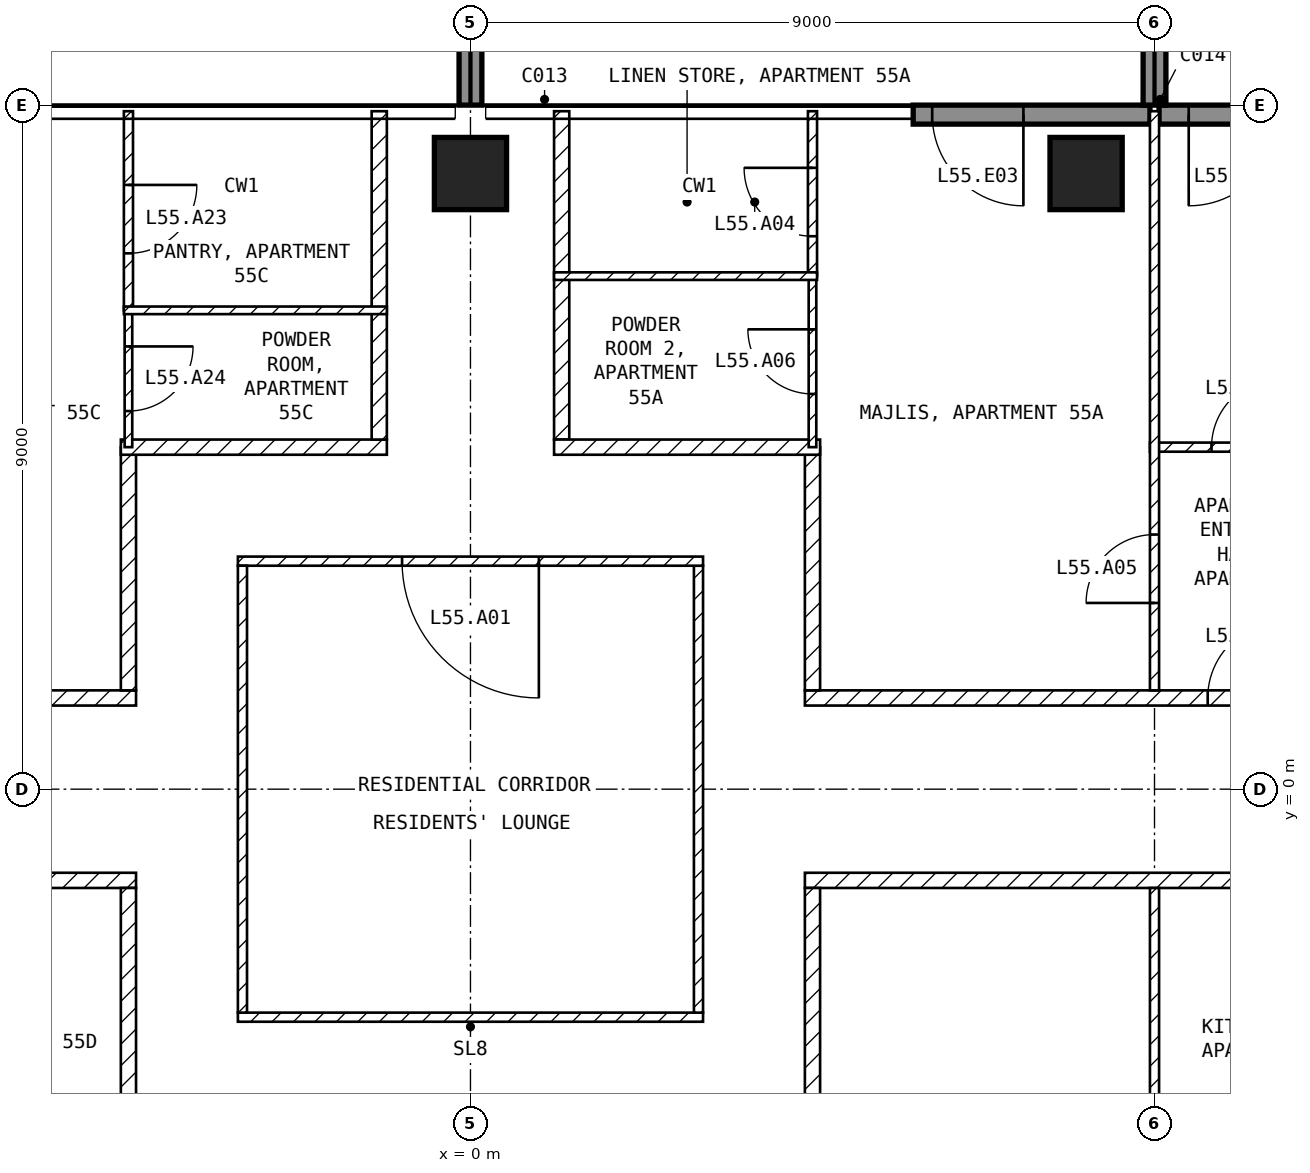
"""IFC4 building model, lengths in metres.
Left out: names, types, materials, properties, quantities, classifications, styles, units other than length and angle.
Written with IfcOpenShell. Run it as: python <this file> out.ifc"""

import sys

from ifc_helpers import new_model, si_unit, direction, frame, frame_2d, origin, origin_2d, place, context, subcontext, project, spatial, rectangle, extrude, element, fill, save


model = new_model("IFC4")
c1 = context("Model", 3, precision=1e-05, world=origin(), true_north=direction((0.0, 1.0)))
c2 = subcontext(c1, "Body", "Model", "MODEL_VIEW")
j1 = project(units=[si_unit("LENGTHUNIT", "METRE"), si_unit("PLANEANGLEUNIT", "RADIAN")], contexts=[c1])
p1 = place(None, origin())
s1 = spatial("IfcSite", under=j1, at=p1, CompositionType="ELEMENT")
p2 = place(p1, origin())
s2 = spatial("IfcBuilding", under=s1, at=p2, CompositionType="ELEMENT")
p3 = place(p2, frame((0.0, 0.0, 219.1)))
s3 = spatial("IfcBuildingStorey", under=s2, at=p3, CompositionType="ELEMENT", Elevation=219.1)
for number, where, z_axis, x_axis in (
    (1, (0.0, 8.1, -0.25), (0.0, 0.0, 1.0), (1.0, 0.0, 0.0)),
    (2, (8.1, 8.1, -0.25), (0.0, 0.0, 1.0), (1.0, 0.0, 0.0)),
):
    element("IfcColumn", number, at=place(p3, frame(where, z_axis=z_axis, x_axis=x_axis)), inside=s3, PredefinedType="COLUMN", context=c2, shape_type="SweptSolid", body=[
        extrude(rectangle(XDim=0.95, YDim=0.95, at=origin_2d()), origin(), (0.0, 0.0, 1.0), 3.45),
    ])
p4 = place(p3, frame((10.9, 8.875, 0.0), z_axis=(0.0, 0.0, 1.0), x_axis=(-1.0, 0.0, 0.0)))
e3 = element("IfcWall", 3, at=p4, inside=s3, PredefinedType="SOLIDWALL", context=c2, shape_type="SweptSolid", body=[
    extrude(rectangle(XDim=1.84, YDim=0.25, at=frame_2d((0.92, 0.0))), origin(), (0.0, 0.0, 1.0), 3.2),
])
p5 = place(p4, frame((0.25, 0.0, 0.0)))
e4 = element("IfcOpeningElement", 4, at=p5, cuts=e3, PredefinedType="OPENING", context=c2, shape_type="SweptSolid", body=[
    extrude(rectangle(XDim=1.2, YDim=2.4, at=frame_2d((0.6, 1.2))), frame((0.0, 0.135, 0.0), z_axis=(0.0, -1.0, 0.0), x_axis=(1.0, 0.0, 0.0)), (0.0, 0.0, 1.0), 0.27),
])
p6 = place(p3, frame((8.94, 8.875, 0.0), z_axis=(0.0, 0.0, 1.0), x_axis=(-1.0, 0.0, 0.0)))
e5 = element("IfcWall", 5, at=p6, inside=s3, PredefinedType="SOLIDWALL", context=c2, shape_type="SweptSolid", body=[
    extrude(rectangle(XDim=3.115, YDim=0.25, at=frame_2d((1.558, 0.0))), origin(), (0.0, 0.0, 1.0), 3.2),
])
p7 = place(p6, frame((1.665, 0.0, 0.0)))
e6 = element("IfcOpeningElement", 6, at=p7, cuts=e5, PredefinedType="OPENING", context=c2, shape_type="SweptSolid", body=[
    extrude(rectangle(XDim=1.2, YDim=2.4, at=frame_2d((0.6, 1.2))), frame((0.0, 0.135, 0.0), z_axis=(0.0, -1.0, 0.0), x_axis=(1.0, 0.0, 0.0)), (0.0, 0.0, 1.0), 0.27),
])
for number, where, z_axis, x_axis in (
    (7, (0.0, 9.0, 0.0), (0.0, 0.0, 1.0), (0.0, 1.0, 0.0)),
    (8, (9.0, 9.0, 0.0), (0.0, 0.0, 1.0), (0.0, 1.0, 0.0)),
):
    element("IfcWall", number, at=place(p3, frame(where, z_axis=z_axis, x_axis=x_axis)), inside=s3, PredefinedType="SOLIDWALL", context=c2, shape_type="SweptSolid", body=[
        extrude(rectangle(XDim=2.7, YDim=0.3, at=frame_2d((1.35, 0.0))), origin(), (0.0, 0.0, 1.0), 3.2),
    ])
p8 = place(p3, frame((-3.06, -3.0, 0.0), z_axis=(0.0, 0.0, 1.0), x_axis=(1.0, 0.0, 0.0)))
e9 = element("IfcWall", 9, at=p8, inside=s3, PredefinedType="PARTITIONING", context=c2, shape_type="SweptSolid", body=[
    extrude(rectangle(XDim=6.12, YDim=0.12, at=frame_2d((3.06, 0.0))), origin(), (0.0, 0.0, 1.0), 3.2),
])
p9 = place(p3, frame((3.0, -2.94, 0.0), z_axis=(0.0, 0.0, 1.0), x_axis=(0.0, 1.0, 0.0)))
e10 = element("IfcWall", 10, at=p9, inside=s3, PredefinedType="PARTITIONING", context=c2, shape_type="SweptSolid", body=[
    extrude(rectangle(XDim=5.88, YDim=0.12, at=frame_2d((2.94, 0.0))), origin(), (0.0, 0.0, 1.0), 3.2),
])
p10 = place(p3, frame((3.06, 3.0, 0.0), z_axis=(0.0, 0.0, 1.0), x_axis=(-1.0, 0.0, 0.0)))
e11 = element("IfcWall", 11, at=p10, inside=s3, PredefinedType="PARTITIONING", context=c2, shape_type="SweptSolid", body=[
    extrude(rectangle(XDim=6.12, YDim=0.12, at=frame_2d((3.06, 0.0))), origin(), (0.0, 0.0, 1.0), 3.2),
])
p11 = place(p10, frame((2.16, 0.0, 0.0)))
e12 = element("IfcOpeningElement", 12, at=p11, cuts=e11, PredefinedType="OPENING", context=c2, shape_type="SweptSolid", body=[
    extrude(rectangle(XDim=1.8, YDim=2.1, at=frame_2d((0.9, 1.05))), frame((0.0, 0.07, 0.0), z_axis=(0.0, -1.0, 0.0), x_axis=(1.0, 0.0, 0.0)), (0.0, 0.0, 1.0), 0.14),
])
p12 = place(p3, frame((-3.0, 2.94, 0.0), z_axis=(0.0, 0.0, 1.0), x_axis=(0.0, -1.0, 0.0)))
e13 = element("IfcWall", 13, at=p12, inside=s3, PredefinedType="PARTITIONING", context=c2, shape_type="SweptSolid", body=[
    extrude(rectangle(XDim=5.88, YDim=0.12, at=frame_2d((2.94, 0.0))), origin(), (0.0, 0.0, 1.0), 3.2),
])
p13 = place(p3, frame((4.4, 1.2, 0.0), z_axis=(0.0, 0.0, 1.0), x_axis=(1.0, 0.0, 0.0)))
e14 = element("IfcWall", 14, at=p13, inside=s3, PredefinedType="PARTITIONING", context=c2, shape_type="SweptSolid", body=[
    extrude(rectangle(XDim=17.2, YDim=0.2, at=frame_2d((8.6, 0.0))), origin(), (0.0, 0.0, 1.0), 3.2),
])
p14 = place(p13, frame((5.3, 0.0, 0.0)))
e15 = element("IfcOpeningElement", 15, at=p14, cuts=e14, PredefinedType="OPENING", context=c2, shape_type="SweptSolid", body=[
    extrude(rectangle(XDim=1.0, YDim=2.1, at=frame_2d((0.5, 1.05))), frame((0.0, 0.11, 0.0), z_axis=(0.0, -1.0, 0.0), x_axis=(1.0, 0.0, 0.0)), (0.0, 0.0, 1.0), 0.22),
])
p15 = place(p3, frame((4.5, 4.5, 0.0), z_axis=(0.0, 0.0, 1.0), x_axis=(0.0, -1.0, 0.0)))
e16 = element("IfcWall", 16, at=p15, inside=s3, PredefinedType="PARTITIONING", context=c2, shape_type="SweptSolid", body=[
    extrude(rectangle(XDim=3.2, YDim=0.2, at=frame_2d((1.6, 0.0))), origin(), (0.0, 0.0, 1.0), 3.2),
])
p16 = place(p3, frame((1.2, 8.92, 0.0), z_axis=(0.0, 0.0, 1.0), x_axis=(0.0, -1.0, 0.0)))
e17 = element("IfcWall", 17, at=p16, inside=s3, PredefinedType="PARTITIONING", context=c2, shape_type="SweptSolid", body=[
    extrude(rectangle(XDim=4.32, YDim=0.2, at=frame_2d((2.16, 0.0))), origin(), (0.0, 0.0, 1.0), 3.2),
])
p17 = place(p3, frame((1.1, 4.5, 0.0), z_axis=(0.0, 0.0, 1.0), x_axis=(1.0, 0.0, 0.0)))
e18 = element("IfcWall", 18, at=p17, inside=s3, PredefinedType="PARTITIONING", context=c2, shape_type="SweptSolid", body=[
    extrude(rectangle(XDim=3.5, YDim=0.2, at=frame_2d((1.75, 0.0))), origin(), (0.0, 0.0, 1.0), 3.2),
])
p18 = place(p3, frame((21.6, -1.2, 0.0), z_axis=(0.0, 0.0, 1.0), x_axis=(-1.0, 0.0, 0.0)))
e19 = element("IfcWall", 19, at=p18, inside=s3, PredefinedType="PARTITIONING", context=c2, shape_type="SweptSolid", body=[
    extrude(rectangle(XDim=17.2, YDim=0.2, at=frame_2d((8.6, 0.0))), origin(), (0.0, 0.0, 1.0), 3.2),
])
p19 = place(p18, frame((4.9, 0.0, 0.0)))
e20 = element("IfcOpeningElement", 20, at=p19, cuts=e19, PredefinedType="OPENING", context=c2, shape_type="SweptSolid", body=[
    extrude(rectangle(XDim=1.0, YDim=2.1, at=frame_2d((0.5, 1.05))), frame((0.0, 0.11, 0.0), z_axis=(0.0, -1.0, 0.0), x_axis=(1.0, 0.0, 0.0)), (0.0, 0.0, 1.0), 0.22),
])
p20 = place(p3, frame((4.5, -1.3, 0.0), z_axis=(0.0, 0.0, 1.0), x_axis=(0.0, -1.0, 0.0)))
e21 = element("IfcWall", 21, at=p20, inside=s3, PredefinedType="PARTITIONING", context=c2, shape_type="SweptSolid", body=[
    extrude(rectangle(XDim=3.2, YDim=0.2, at=frame_2d((1.6, 0.0))), origin(), (0.0, 0.0, 1.0), 3.2),
])
p21 = place(p3, frame((-21.6, 1.2, 0.0), z_axis=(0.0, 0.0, 1.0), x_axis=(1.0, 0.0, 0.0)))
e22 = element("IfcWall", 22, at=p21, inside=s3, PredefinedType="PARTITIONING", context=c2, shape_type="SweptSolid", body=[
    extrude(rectangle(XDim=17.2, YDim=0.2, at=frame_2d((8.6, 0.0))), origin(), (0.0, 0.0, 1.0), 3.2),
])
p22 = place(p21, frame((6.1, 0.0, 0.0)))
e23 = element("IfcOpeningElement", 23, at=p22, cuts=e22, PredefinedType="OPENING", context=c2, shape_type="SweptSolid", body=[
    extrude(rectangle(XDim=1.0, YDim=2.1, at=frame_2d((0.5, 1.05))), frame((0.0, 0.11, 0.0), z_axis=(0.0, -1.0, 0.0), x_axis=(1.0, 0.0, 0.0)), (0.0, 0.0, 1.0), 0.22),
])
p23 = place(p3, frame((-4.5, 1.3, 0.0), z_axis=(0.0, 0.0, 1.0), x_axis=(0.0, 1.0, 0.0)))
e24 = element("IfcWall", 24, at=p23, inside=s3, PredefinedType="PARTITIONING", context=c2, shape_type="SweptSolid", body=[
    extrude(rectangle(XDim=3.2, YDim=0.2, at=frame_2d((1.6, 0.0))), origin(), (0.0, 0.0, 1.0), 3.2),
])
p24 = place(p3, frame((-4.6, 4.5, 0.0), z_axis=(0.0, 0.0, 1.0), x_axis=(1.0, 0.0, 0.0)))
e25 = element("IfcWall", 25, at=p24, inside=s3, PredefinedType="PARTITIONING", context=c2, shape_type="SweptSolid", body=[
    extrude(rectangle(XDim=3.5, YDim=0.2, at=frame_2d((1.75, 0.0))), origin(), (0.0, 0.0, 1.0), 3.2),
])
p25 = place(p3, frame((-1.2, 4.6, 0.0), z_axis=(0.0, 0.0, 1.0), x_axis=(0.0, 1.0, 0.0)))
e26 = element("IfcWall", 26, at=p25, inside=s3, PredefinedType="PARTITIONING", context=c2, shape_type="SweptSolid", body=[
    extrude(rectangle(XDim=4.32, YDim=0.2, at=frame_2d((2.16, 0.0))), origin(), (0.0, 0.0, 1.0), 3.2),
])
p26 = place(p3, frame((-4.4, -1.2, 0.0), z_axis=(0.0, 0.0, 1.0), x_axis=(-1.0, 0.0, 0.0)))
e27 = element("IfcWall", 27, at=p26, inside=s3, PredefinedType="PARTITIONING", context=c2, shape_type="SweptSolid", body=[
    extrude(rectangle(XDim=17.2, YDim=0.2, at=frame_2d((8.6, 0.0))), origin(), (0.0, 0.0, 1.0), 3.2),
])
p27 = place(p26, frame((5.9, 0.0, 0.0)))
e28 = element("IfcOpeningElement", 28, at=p27, cuts=e27, PredefinedType="OPENING", context=c2, shape_type="SweptSolid", body=[
    extrude(rectangle(XDim=1.0, YDim=2.1, at=frame_2d((0.5, 1.05))), frame((0.0, 0.11, 0.0), z_axis=(0.0, -1.0, 0.0), x_axis=(1.0, 0.0, 0.0)), (0.0, 0.0, 1.0), 0.22),
])
p28 = place(p3, frame((-4.5, -4.416, 0.0), z_axis=(0.0, 0.0, 1.0), x_axis=(0.0, 1.0, 0.0)))
e29 = element("IfcWall", 29, at=p28, inside=s3, PredefinedType="PARTITIONING", context=c2, shape_type="SweptSolid", body=[
    extrude(rectangle(XDim=3.116, YDim=0.2, at=frame_2d((1.558, 0.0))), origin(), (0.0, 0.0, 1.0), 3.2),
])
p29 = place(p3, frame((8.94, 4.5, 0.0), z_axis=(0.0, 0.0, 1.0), x_axis=(1.0, 0.0, 0.0)))
e30 = element("IfcWall", 30, at=p29, inside=s3, PredefinedType="PARTITIONING", context=c2, shape_type="SweptSolid", body=[
    extrude(rectangle(XDim=5.46, YDim=0.12, at=frame_2d((2.73, 0.0))), origin(), (0.0, 0.0, 1.0), 3.2),
])
p30 = place(p29, frame((0.81, 0.0, 0.0)))
e31 = element("IfcOpeningElement", 31, at=p30, cuts=e30, PredefinedType="OPENING", context=c2, shape_type="SweptSolid", body=[
    extrude(rectangle(XDim=0.9, YDim=2.1, at=frame_2d((0.45, 1.05))), frame((0.0, 0.07, 0.0), z_axis=(0.0, -1.0, 0.0), x_axis=(1.0, 0.0, 0.0)), (0.0, 0.0, 1.0), 0.14),
])
p31 = place(p3, frame((9.0, 1.3, 0.0), z_axis=(0.0, 0.0, 1.0), x_axis=(0.0, 1.0, 0.0)))
e32 = element("IfcWall", 32, at=p31, inside=s3, PredefinedType="PARTITIONING", context=c2, shape_type="SweptSolid", body=[
    extrude(rectangle(XDim=7.62, YDim=0.12, at=frame_2d((3.81, 0.0))), origin(), (0.0, 0.0, 1.0), 3.2),
])
p32 = place(p31, frame((1.15, 0.0, 0.0)))
e33 = element("IfcOpeningElement", 33, at=p32, cuts=e32, PredefinedType="OPENING", context=c2, shape_type="SweptSolid", body=[
    extrude(rectangle(XDim=0.9, YDim=2.1, at=frame_2d((0.45, 1.05))), frame((0.0, 0.07, 0.0), z_axis=(0.0, -1.0, 0.0), x_axis=(1.0, 0.0, 0.0)), (0.0, 0.0, 1.0), 0.14),
])
p33 = place(p3, frame((4.5, 4.5, 0.0), z_axis=(0.0, 0.0, 1.0), x_axis=(0.0, 1.0, 0.0)))
e34 = element("IfcWall", 34, at=p33, inside=s3, PredefinedType="PARTITIONING", context=c2, shape_type="SweptSolid", body=[
    extrude(rectangle(XDim=2.25, YDim=0.1, at=frame_2d((1.125, 0.0))), origin(), (0.0, 0.0, 1.0), 3.2),
])
p34 = place(p33, frame((0.7, 0.0, 0.0)))
e35 = element("IfcOpeningElement", 35, at=p34, cuts=e34, PredefinedType="OPENING", context=c2, shape_type="SweptSolid", body=[
    extrude(rectangle(XDim=0.85, YDim=2.1, at=frame_2d((0.425, 1.05))), frame((0.0, 0.06, 0.0), z_axis=(0.0, -1.0, 0.0), x_axis=(1.0, 0.0, 0.0)), (0.0, 0.0, 1.0), 0.12),
])
p35 = place(p3, frame((4.5, 6.75, 0.0), z_axis=(0.0, 0.0, 1.0), x_axis=(0.0, 1.0, 0.0)))
e36 = element("IfcWall", 36, at=p35, inside=s3, PredefinedType="PARTITIONING", context=c2, shape_type="SweptSolid", body=[
    extrude(rectangle(XDim=2.17, YDim=0.12, at=frame_2d((1.085, 0.0))), origin(), (0.0, 0.0, 1.0), 3.2),
])
p36 = place(p35, frame((0.525, 0.0, 0.0)))
e37 = element("IfcOpeningElement", 37, at=p36, cuts=e36, PredefinedType="OPENING", context=c2, shape_type="SweptSolid", body=[
    extrude(rectangle(XDim=0.9, YDim=2.1, at=frame_2d((0.45, 1.05))), frame((0.0, 0.07, 0.0), z_axis=(0.0, -1.0, 0.0), x_axis=(1.0, 0.0, 0.0)), (0.0, 0.0, 1.0), 0.14),
])
p37 = place(p3, frame((1.1, 6.75, 0.0), z_axis=(0.0, 0.0, 1.0), x_axis=(1.0, 0.0, 0.0)))
e38 = element("IfcWall", 38, at=p37, inside=s3, PredefinedType="PARTITIONING", context=c2, shape_type="SweptSolid", body=[
    extrude(rectangle(XDim=3.46, YDim=0.1, at=frame_2d((1.73, 0.0))), origin(), (0.0, 0.0, 1.0), 3.2),
])
p38 = place(p3, frame((9.0, -8.92, 0.0), z_axis=(0.0, 0.0, 1.0), x_axis=(0.0, 1.0, 0.0)))
e39 = element("IfcWall", 39, at=p38, inside=s3, PredefinedType="PARTITIONING", context=c2, shape_type="SweptSolid", body=[
    extrude(rectangle(XDim=7.62, YDim=0.12, at=frame_2d((3.81, 0.0))), origin(), (0.0, 0.0, 1.0), 3.2),
])
p39 = place(p38, frame((2.42, 0.0, 0.0)))
e40 = element("IfcOpeningElement", 40, at=p39, cuts=e39, PredefinedType="OPENING", context=c2, shape_type="SweptSolid", body=[
    extrude(rectangle(XDim=0.9, YDim=2.1, at=frame_2d((0.45, 1.05))), frame((0.0, 0.07, 0.0), z_axis=(0.0, -1.0, 0.0), x_axis=(1.0, 0.0, 0.0)), (0.0, 0.0, 1.0), 0.14),
])
p40 = place(p3, frame((-4.5, 6.3, 0.0), z_axis=(0.0, 0.0, 1.0), x_axis=(0.0, -1.0, 0.0)))
e41 = element("IfcWall", 41, at=p40, inside=s3, PredefinedType="PARTITIONING", context=c2, shape_type="SweptSolid", body=[
    extrude(rectangle(XDim=1.8, YDim=0.1, at=frame_2d((0.9, 0.0))), origin(), (0.0, 0.0, 1.0), 3.2),
])
p41 = place(p40, frame((0.475, 0.0, 0.0)))
e42 = element("IfcOpeningElement", 42, at=p41, cuts=e41, PredefinedType="OPENING", context=c2, shape_type="SweptSolid", body=[
    extrude(rectangle(XDim=0.85, YDim=2.1, at=frame_2d((0.425, 1.05))), frame((0.0, 0.06, 0.0), z_axis=(0.0, -1.0, 0.0), x_axis=(1.0, 0.0, 0.0)), (0.0, 0.0, 1.0), 0.12),
])
p42 = place(p3, frame((-4.5, 8.92, 0.0), z_axis=(0.0, 0.0, 1.0), x_axis=(0.0, -1.0, 0.0)))
e43 = element("IfcWall", 43, at=p42, inside=s3, PredefinedType="PARTITIONING", context=c2, shape_type="SweptSolid", body=[
    extrude(rectangle(XDim=2.62, YDim=0.12, at=frame_2d((1.31, 0.0))), origin(), (0.0, 0.0, 1.0), 3.2),
])
p43 = place(p42, frame((0.97, 0.0, 0.0)))
e44 = element("IfcOpeningElement", 44, at=p43, cuts=e43, PredefinedType="OPENING", context=c2, shape_type="SweptSolid", body=[
    extrude(rectangle(XDim=0.9, YDim=2.1, at=frame_2d((0.45, 1.05))), frame((0.0, 0.07, 0.0), z_axis=(0.0, -1.0, 0.0), x_axis=(1.0, 0.0, 0.0)), (0.0, 0.0, 1.0), 0.14),
])
p44 = place(p3, frame((-4.56, 6.3, 0.0), z_axis=(0.0, 0.0, 1.0), x_axis=(1.0, 0.0, 0.0)))
e45 = element("IfcWall", 45, at=p44, inside=s3, PredefinedType="PARTITIONING", context=c2, shape_type="SweptSolid", body=[
    extrude(rectangle(XDim=3.46, YDim=0.1, at=frame_2d((1.73, 0.0))), origin(), (0.0, 0.0, 1.0), 3.2),
])
p45 = place(p5, origin())
e46 = element("IfcDoor", 46, at=p45, inside=s3, OperationType="SINGLE_SWING_RIGHT", PredefinedType="DOOR", context=c2, shape_type="SweptSolid", body=[
    extrude(rectangle(XDim=1.2, YDim=2.4, at=frame_2d((0.6, 1.2))), frame((0.0, 0.025, 0.0), z_axis=(0.0, -1.0, 0.0), x_axis=(1.0, 0.0, 0.0)), (0.0, 0.0, 1.0), 0.05),
])
fill(e4, e46)
p46 = place(p7, origin())
e47 = element("IfcDoor", 47, at=p46, inside=s3, OperationType="SINGLE_SWING_LEFT", PredefinedType="DOOR", context=c2, shape_type="SweptSolid", body=[
    extrude(rectangle(XDim=1.2, YDim=2.4, at=frame_2d((0.6, 1.2))), frame((0.0, 0.025, 0.0), z_axis=(0.0, -1.0, 0.0), x_axis=(1.0, 0.0, 0.0)), (0.0, 0.0, 1.0), 0.05),
])
fill(e6, e47)
p47 = place(p11, origin())
e48 = element("IfcDoor", 48, at=p47, inside=s3, OperationType="SINGLE_SWING_LEFT", PredefinedType="DOOR", context=c2, shape_type="SweptSolid", body=[
    extrude(rectangle(XDim=1.8, YDim=2.1, at=frame_2d((0.9, 1.05))), frame((0.0, 0.025, 0.0), z_axis=(0.0, -1.0, 0.0), x_axis=(1.0, 0.0, 0.0)), (0.0, 0.0, 1.0), 0.05),
])
fill(e12, e48)
p48 = place(p36, origin())
e49 = element("IfcDoor", 49, at=p48, inside=s3, OperationType="SINGLE_SWING_RIGHT", PredefinedType="DOOR", context=c2, shape_type="SweptSolid", body=[
    extrude(rectangle(XDim=0.9, YDim=2.1, at=frame_2d((0.45, 1.05))), frame((0.0, 0.025, 0.0), z_axis=(0.0, -1.0, 0.0), x_axis=(1.0, 0.0, 0.0)), (0.0, 0.0, 1.0), 0.05),
])
fill(e37, e49)
p49 = place(p32, origin())
e50 = element("IfcDoor", 50, at=p49, inside=s3, OperationType="SINGLE_SWING_LEFT", PredefinedType="DOOR", context=c2, shape_type="SweptSolid", body=[
    extrude(rectangle(XDim=0.9, YDim=2.1, at=frame_2d((0.45, 1.05))), frame((0.0, 0.025, 0.0), z_axis=(0.0, -1.0, 0.0), x_axis=(1.0, 0.0, 0.0)), (0.0, 0.0, 1.0), 0.05),
])
fill(e33, e50)
p50 = place(p34, origin())
e51 = element("IfcDoor", 51, at=p50, inside=s3, OperationType="SINGLE_SWING_RIGHT", PredefinedType="DOOR", context=c2, shape_type="SweptSolid", body=[
    extrude(rectangle(XDim=0.85, YDim=2.1, at=frame_2d((0.425, 1.05))), frame((0.0, 0.025, 0.0), z_axis=(0.0, -1.0, 0.0), x_axis=(1.0, 0.0, 0.0)), (0.0, 0.0, 1.0), 0.05),
])
fill(e35, e51)
p51 = place(p30, origin())
e52 = element("IfcDoor", 52, at=p51, inside=s3, OperationType="SINGLE_SWING_RIGHT", PredefinedType="DOOR", context=c2, shape_type="SweptSolid", body=[
    extrude(rectangle(XDim=0.9, YDim=2.1, at=frame_2d((0.45, 1.05))), frame((0.0, 0.025, 0.0), z_axis=(0.0, -1.0, 0.0), x_axis=(1.0, 0.0, 0.0)), (0.0, 0.0, 1.0), 0.05),
])
fill(e31, e52)
p52 = place(p43, origin())
e53 = element("IfcDoor", 53, at=p52, inside=s3, OperationType="SINGLE_SWING_LEFT", PredefinedType="DOOR", context=c2, shape_type="SweptSolid", body=[
    extrude(rectangle(XDim=0.9, YDim=2.1, at=frame_2d((0.45, 1.05))), frame((0.0, 0.025, 0.0), z_axis=(0.0, -1.0, 0.0), x_axis=(1.0, 0.0, 0.0)), (0.0, 0.0, 1.0), 0.05),
])
fill(e44, e53)
p53 = place(p41, origin())
e54 = element("IfcDoor", 54, at=p53, inside=s3, OperationType="SINGLE_SWING_LEFT", PredefinedType="DOOR", context=c2, shape_type="SweptSolid", body=[
    extrude(rectangle(XDim=0.85, YDim=2.1, at=frame_2d((0.425, 1.05))), frame((0.0, 0.025, 0.0), z_axis=(0.0, -1.0, 0.0), x_axis=(1.0, 0.0, 0.0)), (0.0, 0.0, 1.0), 0.05),
])
fill(e42, e54)
p54 = place(p14, origin())
e55 = element("IfcDoor", 55, at=p54, inside=s3, OperationType="SINGLE_SWING_RIGHT", PredefinedType="DOOR", context=c2, shape_type="SweptSolid", body=[
    extrude(rectangle(XDim=1.0, YDim=2.1, at=frame_2d((0.5, 1.05))), frame((0.0, 0.025, 0.0), z_axis=(0.0, -1.0, 0.0), x_axis=(1.0, 0.0, 0.0)), (0.0, 0.0, 1.0), 0.05),
])
fill(e15, e55)
save(model, sys.argv[1])
